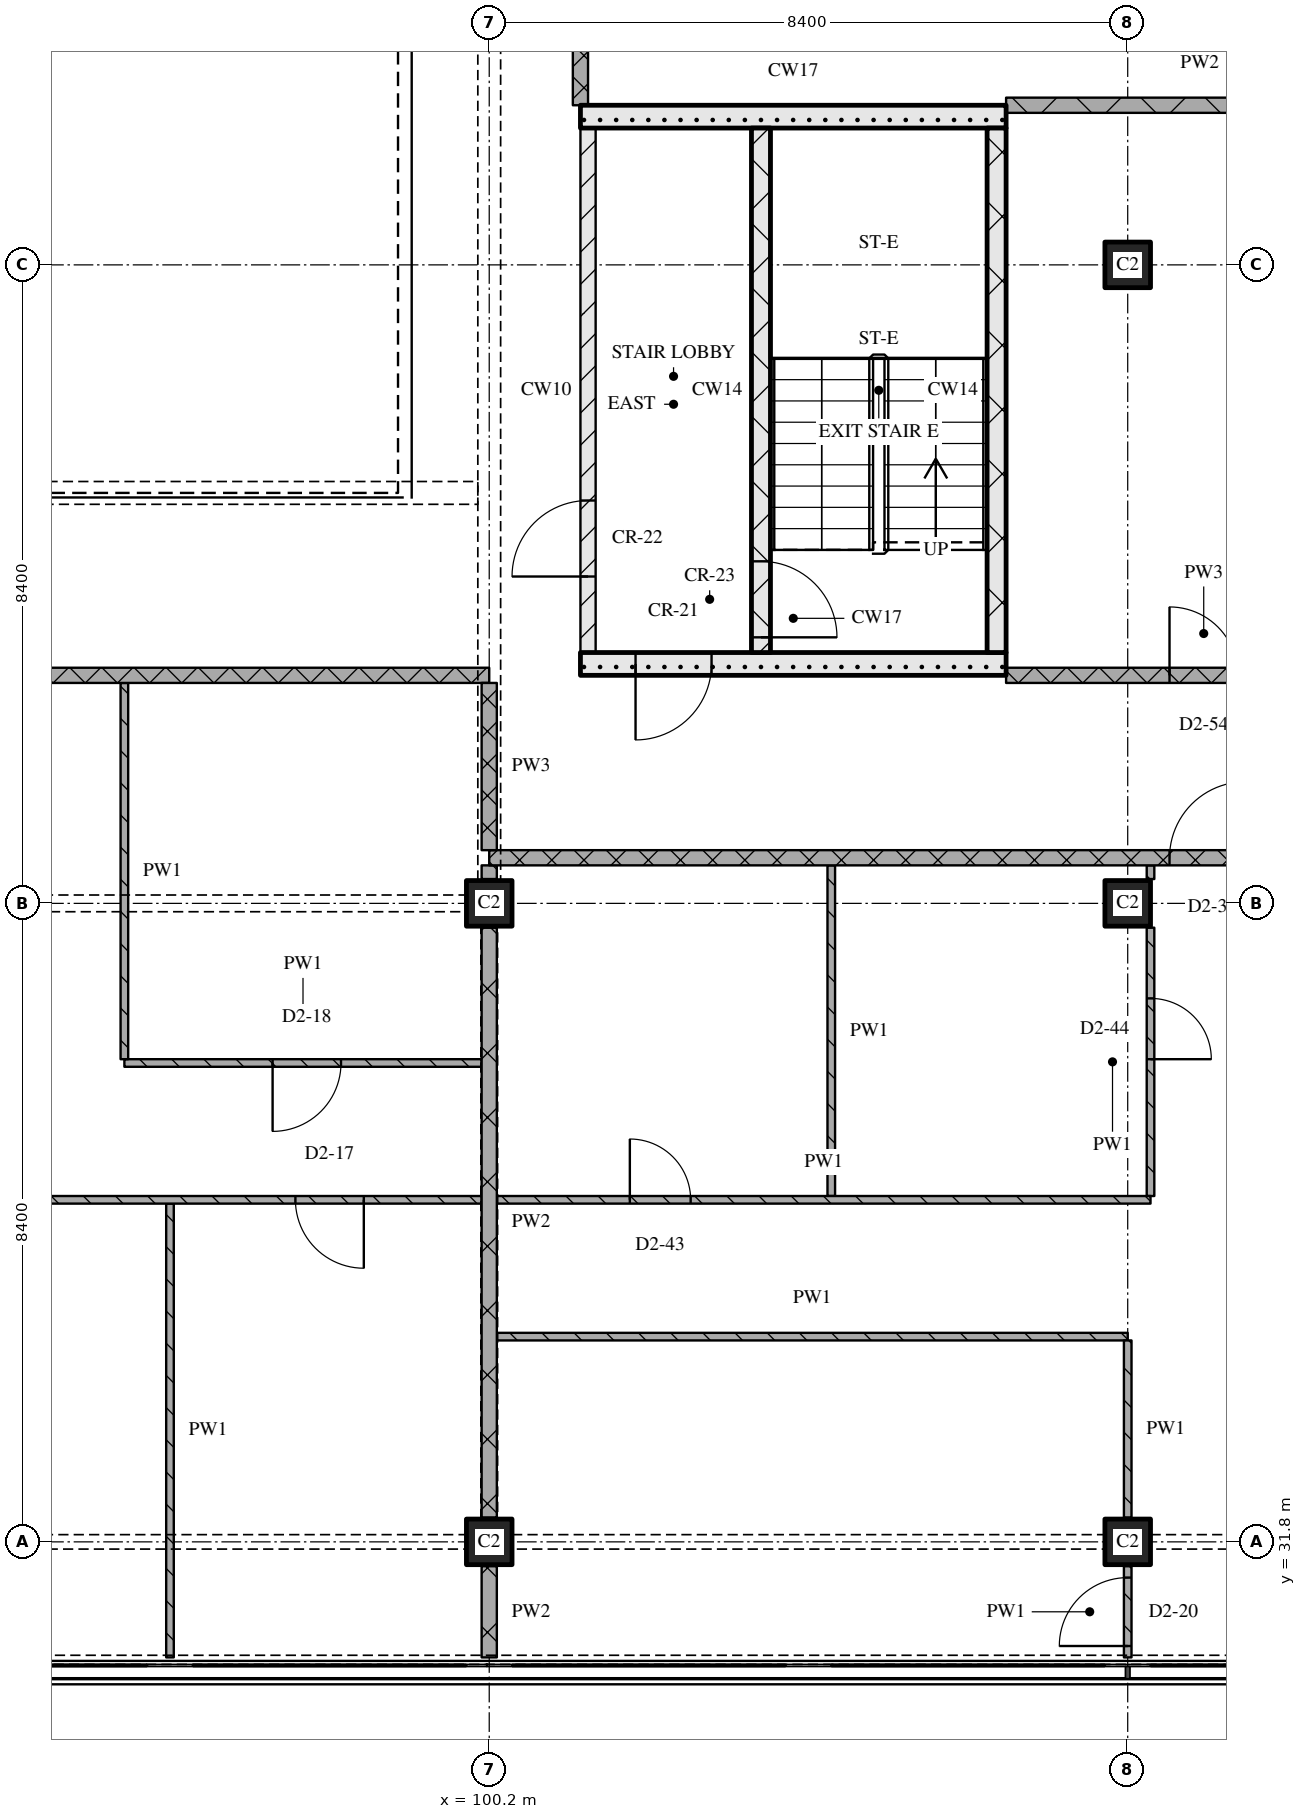
"""IFC4 building model, lengths in metres.
Left out: names, types, materials, properties, quantities, classifications, styles, units other than length and angle.
Written with IfcOpenShell. Run it as: python <this file> out.ifc"""

import sys

from ifc_helpers import new_model, si_unit, direction, frame, frame_2d, origin, origin_2d, place, context, subcontext, project, spatial, rectangle, extrude, element, fill, save


model = new_model("IFC4")
c1 = context("Model", 3, precision=1e-05, world=origin(), true_north=direction((0.0, 1.0)))
c2 = subcontext(c1, "Body", "Model", "MODEL_VIEW")
j1 = project(units=[si_unit("LENGTHUNIT", "METRE"), si_unit("PLANEANGLEUNIT", "RADIAN")], contexts=[c1])
p1 = place(None, origin())
s1 = spatial("IfcSite", under=j1, at=p1, CompositionType="ELEMENT")
p2 = place(p1, origin())
s2 = spatial("IfcBuilding", under=s1, at=p2, CompositionType="ELEMENT")
p3 = place(p2, frame((0.0, 0.0, 216.3)))
s3 = spatial("IfcBuildingStorey", under=s2, at=p3, CompositionType="ELEMENT", Elevation=216.3)
for number, where, z_axis, x_axis in (
    (1, (100.2, 31.8, 0.0), (0.0, 0.0, 1.0), (1.0, 0.0, 0.0)),
    (2, (100.2, 40.2, 0.0), (0.0, 0.0, 1.0), (1.0, 0.0, 0.0)),
    (3, (108.6, 31.8, 0.0), (0.0, 0.0, 1.0), (1.0, 0.0, 0.0)),
    (4, (108.6, 40.2, 0.0), (0.0, 0.0, 1.0), (1.0, 0.0, 0.0)),
    (5, (108.6, 48.6, 0.0), (0.0, 0.0, 1.0), (1.0, 0.0, 0.0)),
):
    element("IfcColumn", number, at=place(p3, frame(where, z_axis=z_axis, x_axis=x_axis)), inside=s3, PredefinedType="COLUMN", context=c2, shape_type="SweptSolid", body=[
        extrude(rectangle(XDim=0.6, YDim=0.6, at=origin_2d()), origin(), (0.0, 0.0, 1.0), 3.6),
    ])
p4 = place(p3, frame((101.4, 43.35, 0.0), z_axis=(0.0, 0.0, 1.0), x_axis=(1.0, 0.0, 0.0)))
e6 = element("IfcWall", 6, at=p4, inside=s3, PredefinedType="SOLIDWALL", context=c2, shape_type="SweptSolid", body=[
    extrude(rectangle(XDim=5.6, YDim=0.3, at=frame_2d((2.8, 0.0))), origin(), (0.0, 0.0, 1.0), 3.32),
])
p5 = place(p4, frame((0.725, 0.0, 0.0)))
e7 = element("IfcOpeningElement", 7, at=p5, cuts=e6, PredefinedType="OPENING", context=c2, shape_type="SweptSolid", body=[
    extrude(rectangle(XDim=1.0, YDim=2.1, at=frame_2d((0.5, 1.05))), frame((0.0, 0.16, 0.0), z_axis=(0.0, -1.0, 0.0), x_axis=(1.0, 0.0, 0.0)), (0.0, 0.0, 1.0), 0.32),
])
p6 = place(p3, frame((101.5, 43.5, 0.0), z_axis=(0.0, 0.0, 1.0), x_axis=(0.0, 1.0, 0.0)))
e8 = element("IfcWall", 8, at=p6, inside=s3, PredefinedType="PARTITIONING", context=c2, shape_type="SweptSolid", body=[
    extrude(rectangle(XDim=6.9, YDim=0.2, at=frame_2d((3.45, 0.0))), origin(), (0.0, 0.0, 1.0), 3.32),
])
p7 = place(p6, frame((1.0, 0.0, 0.0)))
e9 = element("IfcOpeningElement", 9, at=p7, cuts=e8, PredefinedType="OPENING", context=c2, shape_type="SweptSolid", body=[
    extrude(rectangle(XDim=1.0, YDim=2.1, at=frame_2d((0.5, 1.05))), frame((0.0, 0.11, 0.0), z_axis=(0.0, -1.0, 0.0), x_axis=(1.0, 0.0, 0.0)), (0.0, 0.0, 1.0), 0.22),
])
p8 = place(p3, frame((103.775, 43.5, 0.0), z_axis=(0.0, 0.0, 1.0), x_axis=(0.0, 1.0, 0.0)))
e10 = element("IfcWall", 10, at=p8, inside=s3, PredefinedType="SOLIDWALL", context=c2, shape_type="SweptSolid", body=[
    extrude(rectangle(XDim=6.9, YDim=0.25, at=frame_2d((3.45, 0.0))), origin(), (0.0, 0.0, 1.0), 3.32),
])
p9 = place(p8, frame((0.2, 0.0, 0.0)))
e11 = element("IfcOpeningElement", 11, at=p9, cuts=e10, PredefinedType="OPENING", context=c2, shape_type="SweptSolid", body=[
    extrude(rectangle(XDim=1.0, YDim=2.1, at=frame_2d((0.5, 1.05))), frame((0.0, 0.135, 0.0), z_axis=(0.0, -1.0, 0.0), x_axis=(1.0, 0.0, 0.0)), (0.0, 0.0, 1.0), 0.27),
])
p10 = place(p3, frame((106.875, 43.5, 0.0), z_axis=(0.0, 0.0, 1.0), x_axis=(0.0, 1.0, 0.0)))
e12 = element("IfcWall", 12, at=p10, inside=s3, PredefinedType="SOLIDWALL", context=c2, shape_type="SweptSolid", body=[
    extrude(rectangle(XDim=6.9, YDim=0.25, at=frame_2d((3.45, 0.0))), origin(), (0.0, 0.0, 1.0), 3.32),
])
p11 = place(p3, frame((101.4, 50.55, 0.0), z_axis=(0.0, 0.0, 1.0), x_axis=(1.0, 0.0, 0.0)))
e13 = element("IfcWall", 13, at=p11, inside=s3, PredefinedType="SOLIDWALL", context=c2, shape_type="SweptSolid", body=[
    extrude(rectangle(XDim=5.6, YDim=0.3, at=frame_2d((2.8, 0.0))), origin(), (0.0, 0.0, 1.0), 3.32),
])
p12 = place(p3, frame((100.3, 34.5, 0.0), z_axis=(0.0, 0.0, 1.0), x_axis=(1.0, 0.0, 0.0)))
e14 = element("IfcWall", 14, at=p12, inside=s3, PredefinedType="PARTITIONING", context=c2, shape_type="SweptSolid", body=[
    extrude(rectangle(XDim=8.3, YDim=0.1, at=frame_2d((4.15, 0.0))), origin(), (0.0, 0.0, 1.0), 3.32),
])
p13 = place(p3, frame((95.4, 38.1, 0.0), z_axis=(0.0, 0.0, 1.0), x_axis=(1.0, 0.0, 0.0)))
e15 = element("IfcWall", 15, at=p13, inside=s3, PredefinedType="PARTITIONING", context=c2, shape_type="SweptSolid", body=[
    extrude(rectangle(XDim=4.7, YDim=0.1, at=frame_2d((2.35, 0.0))), origin(), (0.0, 0.0, 1.0), 3.32),
])
p14 = place(p13, frame((1.95, 0.0, 0.0)))
e16 = element("IfcOpeningElement", 16, at=p14, cuts=e15, PredefinedType="OPENING", context=c2, shape_type="SweptSolid", body=[
    extrude(rectangle(XDim=0.9, YDim=2.1, at=frame_2d((0.45, 1.05))), frame((0.0, 0.06, 0.0), z_axis=(0.0, -1.0, 0.0), x_axis=(1.0, 0.0, 0.0)), (0.0, 0.0, 1.0), 0.12),
])
p15 = place(p3, frame((124.58, 40.8, 0.0), z_axis=(0.0, 0.0, 1.0), x_axis=(-1.0, 0.0, 0.0)))
e17 = element("IfcWall", 17, at=p15, inside=s3, PredefinedType="PARTITIONING", context=c2, shape_type="SweptSolid", body=[
    extrude(rectangle(XDim=24.38, YDim=0.2, at=frame_2d((12.19, 0.0))), origin(), (0.0, 0.0, 1.0), 3.32),
])
p16 = place(p15, frame((14.43, 0.0, 0.0)))
e18 = element("IfcOpeningElement", 18, at=p16, cuts=e17, PredefinedType="OPENING", context=c2, shape_type="SweptSolid", body=[
    extrude(rectangle(XDim=1.0, YDim=2.1, at=frame_2d((0.5, 1.05))), frame((0.0, 0.11, 0.0), z_axis=(0.0, -1.0, 0.0), x_axis=(1.0, 0.0, 0.0)), (0.0, 0.0, 1.0), 0.22),
])
p17 = place(p3, frame((100.2, 43.2, 0.0), z_axis=(0.0, 0.0, 1.0), x_axis=(-1.0, 0.0, 0.0)))
e19 = element("IfcWall", 19, at=p17, inside=s3, PredefinedType="PARTITIONING", context=c2, shape_type="SweptSolid", body=[
    extrude(rectangle(XDim=25.2, YDim=0.2, at=frame_2d((12.6, 0.0))), origin(), (0.0, 0.0, 1.0), 3.32),
])
p18 = place(p17, frame((12.55, 0.0, 0.0)))
e20 = element("IfcOpeningElement", 20, at=p18, cuts=e19, PredefinedType="OPENING", context=c2, shape_type="SweptSolid", body=[
    extrude(rectangle(XDim=1.0, YDim=2.1, at=frame_2d((0.5, 1.05))), frame((0.0, 0.11, 0.0), z_axis=(0.0, -1.0, 0.0), x_axis=(1.0, 0.0, 0.0)), (0.0, 0.0, 1.0), 0.22),
])
p19 = place(p3, frame((107.0, 43.2, 0.0), z_axis=(0.0, 0.0, 1.0), x_axis=(1.0, 0.0, 0.0)))
e21 = element("IfcWall", 21, at=p19, inside=s3, PredefinedType="PARTITIONING", context=c2, shape_type="SweptSolid", body=[
    extrude(rectangle(XDim=5.2, YDim=0.2, at=frame_2d((2.6, 0.0))), origin(), (0.0, 0.0, 1.0), 3.32),
])
p20 = place(p19, frame((2.15, 0.0, 0.0)))
e22 = element("IfcOpeningElement", 22, at=p20, cuts=e21, PredefinedType="OPENING", context=c2, shape_type="SweptSolid", body=[
    extrude(rectangle(XDim=0.9, YDim=2.1, at=frame_2d((0.45, 1.05))), frame((0.0, 0.11, 0.0), z_axis=(0.0, -1.0, 0.0), x_axis=(1.0, 0.0, 0.0)), (0.0, 0.0, 1.0), 0.22),
])
p21 = place(p3, frame((107.0, 50.7, 0.0), z_axis=(0.0, 0.0, 1.0), x_axis=(1.0, 0.0, 0.0)))
e23 = element("IfcWall", 23, at=p21, inside=s3, PredefinedType="PARTITIONING", context=c2, shape_type="SweptSolid", body=[
    extrude(rectangle(XDim=5.1, YDim=0.2, at=frame_2d((2.55, 0.0))), origin(), (0.0, 0.0, 1.0), 3.32),
])
p22 = place(p3, frame((95.4, 43.1, 0.0), z_axis=(0.0, 0.0, 1.0), x_axis=(0.0, -1.0, 0.0)))
e24 = element("IfcWall", 24, at=p22, inside=s3, PredefinedType="PARTITIONING", context=c2, shape_type="SweptSolid", body=[
    extrude(rectangle(XDim=4.95, YDim=0.1, at=frame_2d((2.475, 0.0))), origin(), (0.0, 0.0, 1.0), 3.32),
])
p23 = place(p3, frame((96.0, 36.25, 0.0), z_axis=(0.0, 0.0, 1.0), x_axis=(0.0, -1.0, 0.0)))
e25 = element("IfcWall", 25, at=p23, inside=s3, PredefinedType="PARTITIONING", context=c2, shape_type="SweptSolid", body=[
    extrude(rectangle(XDim=5.97, YDim=0.1, at=frame_2d((2.985, 0.0))), origin(), (0.0, 0.0, 1.0), 3.32),
])
p24 = place(p3, frame((100.2, 43.1, 0.0), z_axis=(0.0, 0.0, 1.0), x_axis=(0.0, -1.0, 0.0)))
e26 = element("IfcWall", 26, at=p24, inside=s3, PredefinedType="PARTITIONING", context=c2, shape_type="SweptSolid", body=[
    extrude(rectangle(XDim=2.2, YDim=0.2, at=frame_2d((1.1, 0.0))), origin(), (0.0, 0.0, 1.0), 2.53),
])
p25 = place(p3, frame((100.2, 31.48, 0.0), z_axis=(0.0, 0.0, 1.0), x_axis=(0.0, -1.0, 0.0)))
e27 = element("IfcWall", 27, at=p25, inside=s3, PredefinedType="PARTITIONING", context=c2, shape_type="SweptSolid", body=[
    extrude(rectangle(XDim=1.2, YDim=0.2, at=frame_2d((0.6, 0.0))), origin(), (0.0, 0.0, 1.0), 3.32),
])
p26 = place(p3, frame((100.2, 39.88, 0.0), z_axis=(0.0, 0.0, 1.0), x_axis=(0.0, -1.0, 0.0)))
e28 = element("IfcWall", 28, at=p26, inside=s3, PredefinedType="PARTITIONING", context=c2, shape_type="SweptSolid", body=[
    extrude(rectangle(XDim=7.76, YDim=0.2, at=frame_2d((3.88, 0.0))), origin(), (0.0, 0.0, 1.0), 2.72),
])
p27 = place(p3, frame((100.2, 40.7, 0.0), z_axis=(0.0, 0.0, 1.0), x_axis=(0.0, -1.0, 0.0)))
e29 = element("IfcWall", 29, at=p27, inside=s3, PredefinedType="PARTITIONING", context=c2, shape_type="SweptSolid", body=[
    extrude(rectangle(XDim=0.18, YDim=0.2, at=frame_2d((0.09, 0.0))), origin(), (0.0, 0.0, 1.0), 3.32),
])
p28 = place(p3, frame((101.4, 58.7, 0.0), z_axis=(0.0, 0.0, 1.0), x_axis=(0.0, -1.0, 0.0)))
e30 = element("IfcWall", 30, at=p28, inside=s3, PredefinedType="PARTITIONING", context=c2, shape_type="SweptSolid", body=[
    extrude(rectangle(XDim=8.0, YDim=0.2, at=frame_2d((4.0, 0.0))), origin(), (0.0, 0.0, 1.0), 3.32),
])
p29 = place(p28, frame((1.225, 0.0, 0.9)))
e31 = element("IfcOpeningElement", 31, at=p29, cuts=e30, PredefinedType="OPENING", context=c2, shape_type="SweptSolid", body=[
    extrude(rectangle(XDim=1.5, YDim=1.5, at=frame_2d((0.75, 0.75))), frame((0.0, 0.11, 0.0), z_axis=(0.0, -1.0, 0.0), x_axis=(1.0, 0.0, 0.0)), (0.0, 0.0, 1.0), 0.22),
])
p30 = place(p3, frame((104.7, 40.7, 0.0), z_axis=(0.0, 0.0, 1.0), x_axis=(0.0, -1.0, 0.0)))
e32 = element("IfcWall", 32, at=p30, inside=s3, PredefinedType="PARTITIONING", context=c2, shape_type="SweptSolid", body=[
    extrude(rectangle(XDim=4.35, YDim=0.1, at=frame_2d((2.175, 0.0))), origin(), (0.0, 0.0, 1.0), 3.32),
])
p31 = place(p3, frame((108.6, 30.28, 0.0), z_axis=(0.0, 0.0, 1.0), x_axis=(0.0, 1.0, 0.0)))
e33 = element("IfcWall", 33, at=p31, inside=s3, PredefinedType="PARTITIONING", context=c2, shape_type="SweptSolid", body=[
    extrude(rectangle(XDim=1.2, YDim=0.1, at=frame_2d((0.6, 0.0))), origin(), (0.0, 0.0, 1.0), 3.32),
])
p32 = place(p31, frame((0.15, 0.0, 0.0)))
e34 = element("IfcOpeningElement", 34, at=p32, cuts=e33, PredefinedType="OPENING", context=c2, shape_type="SweptSolid", body=[
    extrude(rectangle(XDim=0.9, YDim=2.1, at=frame_2d((0.45, 1.05))), frame((0.0, 0.06, 0.0), z_axis=(0.0, -1.0, 0.0), x_axis=(1.0, 0.0, 0.0)), (0.0, 0.0, 1.0), 0.12),
])
p33 = place(p3, frame((108.6, 34.45, 0.0), z_axis=(0.0, 0.0, 1.0), x_axis=(0.0, -1.0, 0.0)))
e35 = element("IfcWall", 35, at=p33, inside=s3, PredefinedType="PARTITIONING", context=c2, shape_type="SweptSolid", body=[
    extrude(rectangle(XDim=2.33, YDim=0.1, at=frame_2d((1.165, 0.0))), origin(), (0.0, 0.0, 1.0), 3.32),
])
p34 = place(p3, frame((108.9, 36.35, 0.0), z_axis=(0.0, 0.0, 1.0), x_axis=(0.0, 1.0, 0.0)))
e36 = element("IfcWall", 36, at=p34, inside=s3, PredefinedType="PARTITIONING", context=c2, shape_type="SweptSolid", body=[
    extrude(rectangle(XDim=3.53, YDim=0.1, at=frame_2d((1.765, 0.0))), origin(), (0.0, 0.0, 1.0), 3.32),
])
p35 = place(p34, frame((1.8, 0.0, 0.0)))
e37 = element("IfcOpeningElement", 37, at=p35, cuts=e36, PredefinedType="OPENING", context=c2, shape_type="SweptSolid", body=[
    extrude(rectangle(XDim=0.8, YDim=2.1, at=frame_2d((0.4, 1.05))), frame((0.0, 0.06, 0.0), z_axis=(0.0, -1.0, 0.0), x_axis=(1.0, 0.0, 0.0)), (0.0, 0.0, 1.0), 0.12),
])
p36 = place(p3, frame((108.9, 40.7, 0.0), z_axis=(0.0, 0.0, 1.0), x_axis=(0.0, -1.0, 0.0)))
e38 = element("IfcWall", 38, at=p36, inside=s3, PredefinedType="PARTITIONING", context=c2, shape_type="SweptSolid", body=[
    extrude(rectangle(XDim=0.18, YDim=0.1, at=frame_2d((0.09, 0.0))), origin(), (0.0, 0.0, 1.0), 3.32),
])
p37 = place(p3, frame((100.1, 36.3, 0.0), z_axis=(0.0, 0.0, 1.0), x_axis=(-1.0, 0.0, 0.0)))
e39 = element("IfcWall", 39, at=p37, inside=s3, PredefinedType="PARTITIONING", context=c2, shape_type="SweptSolid", body=[
    extrude(rectangle(XDim=20.9, YDim=0.1, at=frame_2d((10.45, 0.0))), origin(), (0.0, 0.0, 1.0), 3.32),
])
p38 = place(p37, frame((1.55, 0.0, 0.0)))
e40 = element("IfcOpeningElement", 40, at=p38, cuts=e39, PredefinedType="OPENING", context=c2, shape_type="SweptSolid", body=[
    extrude(rectangle(XDim=0.9, YDim=2.1, at=frame_2d((0.45, 1.05))), frame((0.0, 0.06, 0.0), z_axis=(0.0, -1.0, 0.0), x_axis=(1.0, 0.0, 0.0)), (0.0, 0.0, 1.0), 0.12),
])
p39 = place(p37, frame((7.85, 0.0, 0.0)))
e41 = element("IfcOpeningElement", 41, at=p39, cuts=e39, PredefinedType="OPENING", context=c2, shape_type="SweptSolid", body=[
    extrude(rectangle(XDim=0.9, YDim=2.1, at=frame_2d((0.45, 1.05))), frame((0.0, 0.06, 0.0), z_axis=(0.0, -1.0, 0.0), x_axis=(1.0, 0.0, 0.0)), (0.0, 0.0, 1.0), 0.12),
])
p40 = place(p37, frame((16.25, 0.0, 0.0)))
e42 = element("IfcOpeningElement", 42, at=p40, cuts=e39, PredefinedType="OPENING", context=c2, shape_type="SweptSolid", body=[
    extrude(rectangle(XDim=0.9, YDim=2.1, at=frame_2d((0.45, 1.05))), frame((0.0, 0.06, 0.0), z_axis=(0.0, -1.0, 0.0), x_axis=(1.0, 0.0, 0.0)), (0.0, 0.0, 1.0), 0.12),
])
p41 = place(p3, frame((100.3, 36.3, 0.0), z_axis=(0.0, 0.0, 1.0), x_axis=(1.0, 0.0, 0.0)))
e43 = element("IfcWall", 43, at=p41, inside=s3, PredefinedType="PARTITIONING", context=c2, shape_type="SweptSolid", body=[
    extrude(rectangle(XDim=8.6, YDim=0.1, at=frame_2d((4.3, 0.0))), origin(), (0.0, 0.0, 1.0), 3.32),
])
p42 = place(p41, frame((1.75, 0.0, 0.0)))
e44 = element("IfcOpeningElement", 44, at=p42, cuts=e43, PredefinedType="OPENING", context=c2, shape_type="SweptSolid", body=[
    extrude(rectangle(XDim=0.8, YDim=2.1, at=frame_2d((0.4, 1.05))), frame((0.0, 0.06, 0.0), z_axis=(0.0, -1.0, 0.0), x_axis=(1.0, 0.0, 0.0)), (0.0, 0.0, 1.0), 0.12),
])
p43 = place(p5, origin())
e45 = element("IfcDoor", 45, at=p43, inside=s3, OperationType="SINGLE_SWING_RIGHT", PredefinedType="DOOR", context=c2, shape_type="SweptSolid", body=[
    extrude(rectangle(XDim=1.0, YDim=2.1, at=frame_2d((0.5, 1.05))), frame((0.0, 0.025, 0.0), z_axis=(0.0, -1.0, 0.0), x_axis=(1.0, 0.0, 0.0)), (0.0, 0.0, 1.0), 0.05),
])
fill(e7, e45)
p44 = place(p9, origin())
e46 = element("IfcDoor", 46, at=p44, inside=s3, OperationType="SINGLE_SWING_RIGHT", PredefinedType="DOOR", context=c2, shape_type="SweptSolid", body=[
    extrude(rectangle(XDim=1.0, YDim=2.1, at=frame_2d((0.5, 1.05))), frame((0.0, 0.025, 0.0), z_axis=(0.0, -1.0, 0.0), x_axis=(1.0, 0.0, 0.0)), (0.0, 0.0, 1.0), 0.05),
])
fill(e11, e46)
p45 = place(p7, origin())
e47 = element("IfcDoor", 47, at=p45, inside=s3, OperationType="SINGLE_SWING_LEFT", PredefinedType="DOOR", context=c2, shape_type="SweptSolid", body=[
    extrude(rectangle(XDim=1.0, YDim=2.1, at=frame_2d((0.5, 1.05))), frame((0.0, 0.025, 0.0), z_axis=(0.0, -1.0, 0.0), x_axis=(1.0, 0.0, 0.0)), (0.0, 0.0, 1.0), 0.05),
])
fill(e9, e47)
p46 = place(p14, origin())
e48 = element("IfcDoor", 48, at=p46, inside=s3, OperationType="SINGLE_SWING_RIGHT", PredefinedType="DOOR", context=c2, shape_type="SweptSolid", body=[
    extrude(rectangle(XDim=0.9, YDim=2.1, at=frame_2d((0.45, 1.05))), frame((0.0, 0.025, 0.0), z_axis=(0.0, -1.0, 0.0), x_axis=(1.0, 0.0, 0.0)), (0.0, 0.0, 1.0), 0.05),
])
fill(e16, e48)
p47 = place(p16, origin())
e49 = element("IfcDoor", 49, at=p47, inside=s3, OperationType="SINGLE_SWING_RIGHT", PredefinedType="DOOR", context=c2, shape_type="SweptSolid", body=[
    extrude(rectangle(XDim=1.0, YDim=2.1, at=frame_2d((0.5, 1.05))), frame((0.0, 0.025, 0.0), z_axis=(0.0, -1.0, 0.0), x_axis=(1.0, 0.0, 0.0)), (0.0, 0.0, 1.0), 0.05),
])
fill(e18, e49)
p48 = place(p20, origin())
e50 = element("IfcDoor", 50, at=p48, inside=s3, OperationType="SINGLE_SWING_LEFT", PredefinedType="DOOR", context=c2, shape_type="SweptSolid", body=[
    extrude(rectangle(XDim=0.9, YDim=2.1, at=frame_2d((0.45, 1.05))), frame((0.0, 0.025, 0.0), z_axis=(0.0, -1.0, 0.0), x_axis=(1.0, 0.0, 0.0)), (0.0, 0.0, 1.0), 0.05),
])
fill(e22, e50)
p49 = place(p32, origin())
e51 = element("IfcDoor", 51, at=p49, inside=s3, OperationType="SINGLE_SWING_LEFT", PredefinedType="DOOR", context=c2, shape_type="SweptSolid", body=[
    extrude(rectangle(XDim=0.9, YDim=2.1, at=frame_2d((0.45, 1.05))), frame((0.0, 0.025, 0.0), z_axis=(0.0, -1.0, 0.0), x_axis=(1.0, 0.0, 0.0)), (0.0, 0.0, 1.0), 0.05),
])
fill(e34, e51)
p50 = place(p35, origin())
e52 = element("IfcDoor", 52, at=p50, inside=s3, OperationType="SINGLE_SWING_RIGHT", PredefinedType="DOOR", context=c2, shape_type="SweptSolid", body=[
    extrude(rectangle(XDim=0.8, YDim=2.1, at=frame_2d((0.4, 1.05))), frame((0.0, 0.025, 0.0), z_axis=(0.0, -1.0, 0.0), x_axis=(1.0, 0.0, 0.0)), (0.0, 0.0, 1.0), 0.05),
])
fill(e37, e52)
p51 = place(p38, origin())
e53 = element("IfcDoor", 53, at=p51, inside=s3, OperationType="SINGLE_SWING_LEFT", PredefinedType="DOOR", context=c2, shape_type="SweptSolid", body=[
    extrude(rectangle(XDim=0.9, YDim=2.1, at=frame_2d((0.45, 1.05))), frame((0.0, 0.025, 0.0), z_axis=(0.0, -1.0, 0.0), x_axis=(1.0, 0.0, 0.0)), (0.0, 0.0, 1.0), 0.05),
])
fill(e40, e53)
p52 = place(p42, origin())
e54 = element("IfcDoor", 54, at=p52, inside=s3, OperationType="SINGLE_SWING_LEFT", PredefinedType="DOOR", context=c2, shape_type="SweptSolid", body=[
    extrude(rectangle(XDim=0.8, YDim=2.1, at=frame_2d((0.4, 1.05))), frame((0.0, 0.025, 0.0), z_axis=(0.0, -1.0, 0.0), x_axis=(1.0, 0.0, 0.0)), (0.0, 0.0, 1.0), 0.05),
])
fill(e44, e54)
save(model, sys.argv[1])
